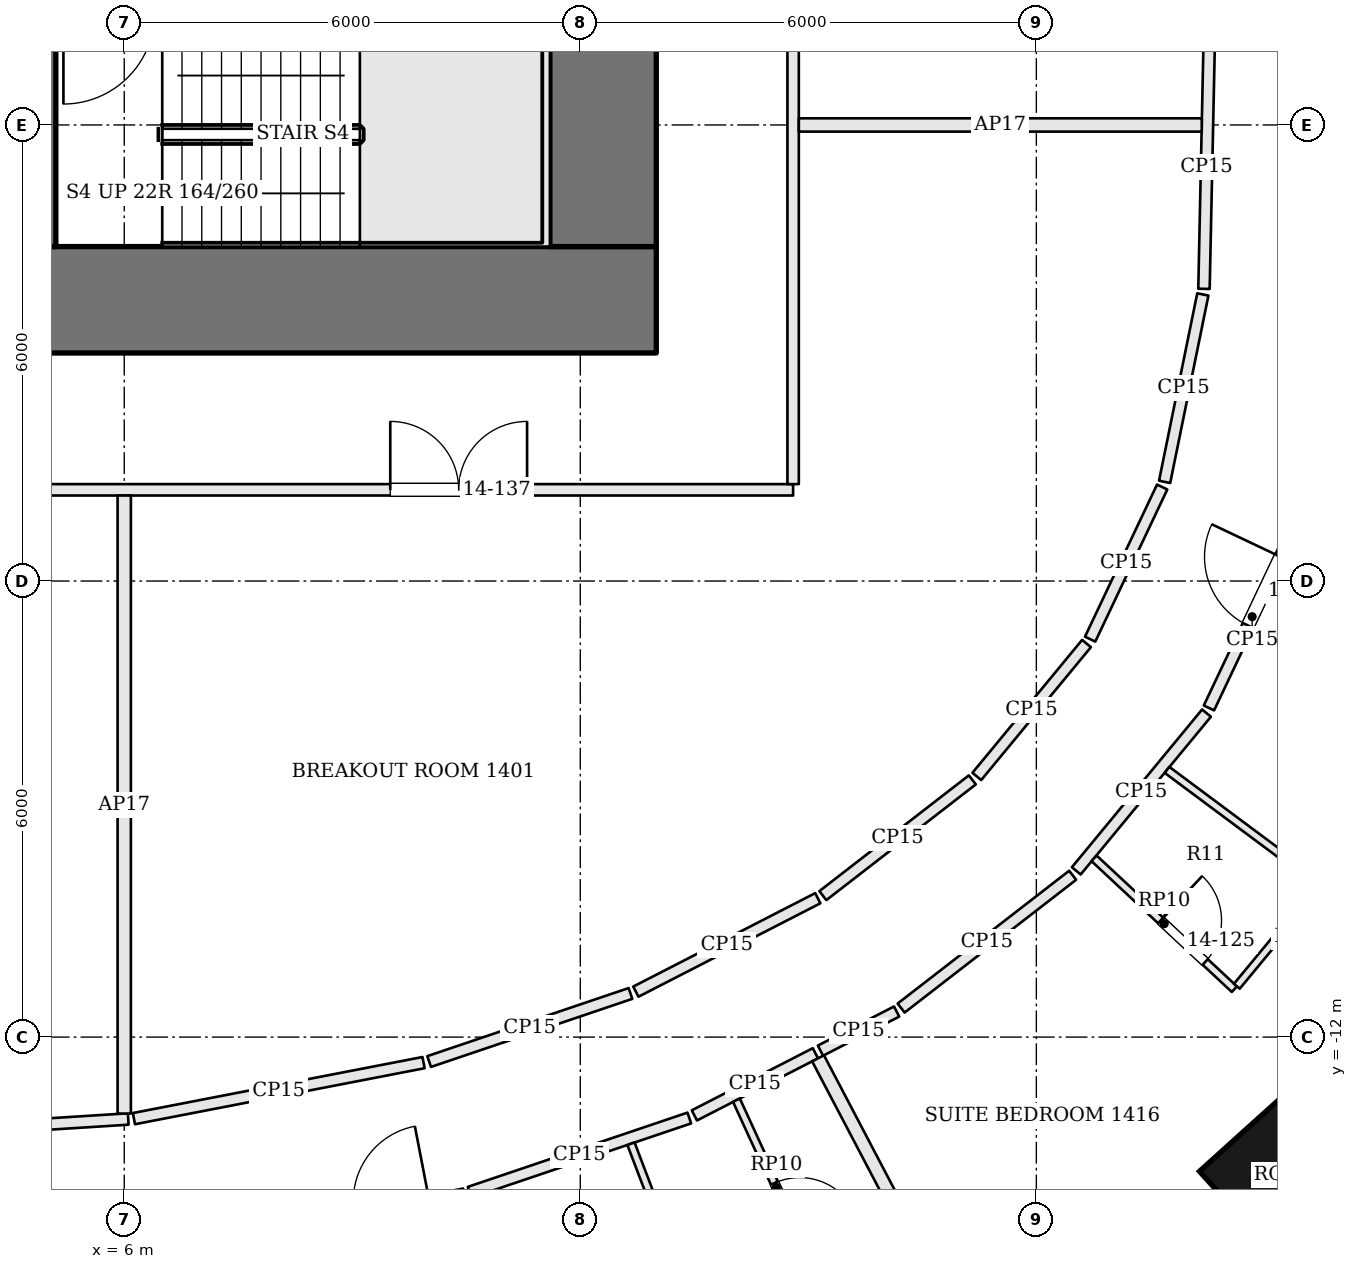
"""IFC4 building model, lengths in metres.
Left out: names, types, materials, properties, quantities, classifications, styles, units other than length and angle.
Written with IfcOpenShell. Run it as: python <this file> out.ifc"""

import sys

from ifc_helpers import new_model, si_unit, direction, frame, frame_2d, origin, origin_2d, place, context, subcontext, project, spatial, rectangle, extrude, element, fill, save


model = new_model("IFC4")
c1 = context("Model", 3, precision=1e-05, world=origin(), true_north=direction((0.0, 1.0)))
c2 = subcontext(c1, "Body", "Model", "MODEL_VIEW")
j1 = project(units=[si_unit("LENGTHUNIT", "METRE"), si_unit("PLANEANGLEUNIT", "RADIAN")], contexts=[c1])
p1 = place(None, origin())
s1 = spatial("IfcSite", under=j1, at=p1, CompositionType="ELEMENT")
p2 = place(p1, origin())
s2 = spatial("IfcBuilding", under=s1, at=p2, CompositionType="ELEMENT")
p3 = place(p2, frame((0.0, 0.0, 66.3)))
s3 = spatial("IfcBuildingStorey", under=s2, at=p3, CompositionType="ELEMENT", Elevation=66.3)
p4 = place(p3, frame((-13.0, -2.3, 0.0), z_axis=(0.0, 0.0, 1.0), x_axis=(1.0, 0.0, 0.0)))
e1 = element("IfcWall", 1, at=p4, inside=s3, PredefinedType="SHEAR", context=c2, shape_type="SweptSolid", body=[
    extrude(rectangle(XDim=26.0, YDim=1.4, at=frame_2d((13.0, 0.0))), origin(), (0.0, 0.0, 1.0), 3.6),
])
p5 = place(p4, frame((8.825, 0.0, 0.0)))
e2 = element("IfcOpeningElement", 2, at=p5, cuts=e1, PredefinedType="OPENING", context=c2, shape_type="SweptSolid", body=[
    extrude(rectangle(XDim=1.0, YDim=2.1, at=frame_2d((0.5, 1.05))), frame((0.0, 0.71, 0.0), z_axis=(0.0, -1.0, 0.0), x_axis=(1.0, 0.0, 0.0)), (0.0, 0.0, 1.0), 1.42),
])
p6 = place(p4, frame((11.025, 0.0, 0.0)))
e3 = element("IfcOpeningElement", 3, at=p6, cuts=e1, PredefinedType="OPENING", context=c2, shape_type="SweptSolid", body=[
    extrude(rectangle(XDim=0.7, YDim=2.1, at=frame_2d((0.35, 1.05))), frame((0.0, 0.71, 0.0), z_axis=(0.0, -1.0, 0.0), x_axis=(1.0, 0.0, 0.0)), (0.0, 0.0, 1.0), 1.42),
])
p7 = place(p4, frame((12.925, 0.0, 0.0)))
e4 = element("IfcOpeningElement", 4, at=p7, cuts=e1, PredefinedType="OPENING", context=c2, shape_type="SweptSolid", body=[
    extrude(rectangle(XDim=1.0, YDim=2.1, at=frame_2d((0.5, 1.05))), frame((0.0, 0.71, 0.0), z_axis=(0.0, -1.0, 0.0), x_axis=(1.0, 0.0, 0.0)), (0.0, 0.0, 1.0), 1.42),
])
p8 = place(p4, frame((15.775, 0.0, 0.0)))
e5 = element("IfcOpeningElement", 5, at=p8, cuts=e1, PredefinedType="OPENING", context=c2, shape_type="SweptSolid", body=[
    extrude(rectangle(XDim=1.0, YDim=2.1, at=frame_2d((0.5, 1.05))), frame((0.0, 0.71, 0.0), z_axis=(0.0, -1.0, 0.0), x_axis=(1.0, 0.0, 0.0)), (0.0, 0.0, 1.0), 1.42),
])
p9 = place(p3, frame((12.3, -1.6, 0.0), z_axis=(0.0, 0.0, 1.0), x_axis=(0.0, 1.0, 0.0)))
e6 = element("IfcWall", 6, at=p9, inside=s3, PredefinedType="SHEAR", context=c2, shape_type="SweptSolid", body=[
    extrude(rectangle(XDim=12.2, YDim=1.4, at=frame_2d((6.1, 0.0))), origin(), (0.0, 0.0, 1.0), 3.6),
])
p10 = place(p9, frame((6.8, 0.0, 0.0)))
e7 = element("IfcOpeningElement", 7, at=p10, cuts=e6, PredefinedType="OPENING", context=c2, shape_type="SweptSolid", body=[
    extrude(rectangle(XDim=1.8, YDim=2.1, at=frame_2d((0.9, 1.05))), frame((0.0, 0.71, 0.0), z_axis=(0.0, -1.0, 0.0), x_axis=(1.0, 0.0, 0.0)), (0.0, 0.0, 1.0), 1.42),
])
p11 = place(p3, frame((21.135, -13.817, 0.0), z_axis=(0.0, 0.0, 1.0), x_axis=(0.742675944539, 0.66965098477, 0.0)))
e8 = element("IfcColumn", 8, at=p11, inside=s3, PredefinedType="COLUMN", context=c2, shape_type="SweptSolid", body=[
    extrude(rectangle(XDim=1.4, YDim=1.4, at=origin_2d()), origin(), (0.0, 0.0, 1.0), 3.6),
])
p12 = place(p3, frame((21.266, -14.805, 0.0), z_axis=(0.0, 0.0, 1.0), x_axis=(0.861975457737, 0.506950007653, 0.0)))
e9 = element("IfcWall", 9, at=p12, inside=s3, PredefinedType="SOLIDWALL", context=c2, shape_type="SweptSolid", body=[
    extrude(rectangle(XDim=4.413, YDim=0.45, at=frame_2d((2.207, 0.0))), origin(), (0.0, 0.0, 1.0), 3.4),
])
p13 = place(p12, frame((1.156, 0.0, 0.9)))
e10 = element("IfcOpeningElement", 10, at=p13, cuts=e9, PredefinedType="OPENING", context=c2, shape_type="SweptSolid", body=[
    extrude(rectangle(XDim=2.1, YDim=2.0, at=frame_2d((1.05, 1.0))), frame((0.0, 0.235, 0.0), z_axis=(0.0, -1.0, 0.0), x_axis=(1.0, 0.0, 0.0)), (0.0, 0.0, 1.0), 0.47),
])
p14 = place(p3, frame((4.975, 10.6, 0.0), z_axis=(0.0, 0.0, 1.0), x_axis=(0.0, -1.0, 0.0)))
e11 = element("IfcWall", 11, at=p14, inside=s3, PredefinedType="SOLIDWALL", context=c2, shape_type="SweptSolid", body=[
    extrude(rectangle(XDim=12.2, YDim=0.25, at=frame_2d((6.1, 0.0))), origin(), (0.0, 0.0, 1.0), 3.4),
])
p15 = place(p14, frame((4.65, 0.0, 0.0)))
e12 = element("IfcOpeningElement", 12, at=p15, cuts=e11, PredefinedType="OPENING", context=c2, shape_type="SweptSolid", body=[
    extrude(rectangle(XDim=1.2, YDim=2.1, at=frame_2d((0.6, 1.05))), frame((0.0, 0.135, 0.0), z_axis=(0.0, -1.0, 0.0), x_axis=(1.0, 0.0, 0.0)), (0.0, 0.0, 1.0), 0.27),
])
p16 = place(p3, frame((6.43, -14.848, 0.0), z_axis=(0.0, 0.0, 1.0), x_axis=(0.981801609996, 0.189909448446, 0.0)))
e13 = element("IfcWall", 13, at=p16, inside=s3, PredefinedType="PARTITIONING", context=c2, shape_type="SweptSolid", body=[
    extrude(rectangle(XDim=4.118, YDim=0.15, at=frame_2d((2.059, 0.0))), origin(), (0.0, 0.0, 1.0), 2.68),
])
p17 = place(p16, frame((2.65, 0.0, 0.0)))
e14 = element("IfcOpeningElement", 14, at=p17, cuts=e13, PredefinedType="OPENING", context=c2, shape_type="SweptSolid", body=[
    extrude(rectangle(XDim=1.0, YDim=2.1, at=frame_2d((0.5, 1.05))), frame((0.0, 0.085, 0.0), z_axis=(0.0, -1.0, 0.0), x_axis=(1.0, 0.0, 0.0)), (0.0, 0.0, 1.0), 0.17),
])
p18 = place(p3, frame((10.544, -14.042, 0.0), z_axis=(0.0, 0.0, 1.0), x_axis=(0.947314242069, 0.320305677085, 0.0)))
e15 = element("IfcWall", 15, at=p18, inside=s3, PredefinedType="PARTITIONING", context=c2, shape_type="SweptSolid", body=[
    extrude(rectangle(XDim=3.051, YDim=0.15, at=frame_2d((1.525, 0.0))), origin(), (0.0, 0.0, 1.0), 2.68),
])
p19 = place(p3, frame((13.501, -13.03, 0.0), z_axis=(0.0, 0.0, 1.0), x_axis=(0.88960147572, 0.456737577168, 0.0)))
e16 = element("IfcWall", 16, at=p19, inside=s3, PredefinedType="PARTITIONING", context=c2, shape_type="SweptSolid", body=[
    extrude(rectangle(XDim=1.79, YDim=0.15, at=frame_2d((0.895, 0.0))), origin(), (0.0, 0.0, 1.0), 2.68),
])
p20 = place(p3, frame((18.439, -18.586, 0.0), z_axis=(0.0, 0.0, 1.0), x_axis=(-0.464812403085, 0.885409187855, 0.0)))
e17 = element("IfcWall", 17, at=p20, inside=s3, PredefinedType="PARTITIONING", context=c2, shape_type="SweptSolid", body=[
    extrude(rectangle(XDim=7.123, YDim=0.175, at=frame_2d((3.562, 0.0))), origin(), (0.0, 0.0, 1.0), 2.68),
])
p21 = place(p3, frame((15.16, -12.178, 0.0), z_axis=(0.0, 0.0, 1.0), x_axis=(0.889562255844, 0.456813958826, 0.0)))
e18 = element("IfcWall", 18, at=p21, inside=s3, PredefinedType="PARTITIONING", context=c2, shape_type="SweptSolid", body=[
    extrude(rectangle(XDim=1.126, YDim=0.15, at=frame_2d((0.563, 0.0))), origin(), (0.0, 0.0, 1.0), 2.68),
])
p22 = place(p3, frame((16.221, -11.618, 0.0), z_axis=(0.0, 0.0, 1.0), x_axis=(0.79075977513, 0.612126602948, 0.0)))
e19 = element("IfcWall", 19, at=p22, inside=s3, PredefinedType="PARTITIONING", context=c2, shape_type="SweptSolid", body=[
    extrude(rectangle(XDim=2.854, YDim=0.15, at=frame_2d((1.427, 0.0))), origin(), (0.0, 0.0, 1.0), 2.68),
])
p23 = place(p3, frame((18.525, -9.813, 0.0), z_axis=(0.0, 0.0, 1.0), x_axis=(0.636590727548, 0.771201818981, 0.0)))
e20 = element("IfcWall", 20, at=p23, inside=s3, PredefinedType="PARTITIONING", context=c2, shape_type="SweptSolid", body=[
    extrude(rectangle(XDim=2.691, YDim=0.15, at=frame_2d((1.346, 0.0))), origin(), (0.0, 0.0, 1.0), 2.68),
])
p24 = place(p3, frame((20.271, -7.67, 0.0), z_axis=(0.0, 0.0, 1.0), x_axis=(0.427995478521, 0.903780875193, 0.0)))
e21 = element("IfcWall", 21, at=p24, inside=s3, PredefinedType="PARTITIONING", context=c2, shape_type="SweptSolid", body=[
    extrude(rectangle(XDim=2.656, YDim=0.15, at=frame_2d((1.328, 0.0))), origin(), (0.0, 0.0, 1.0), 2.68),
])
p25 = place(p24, frame((1.2, 0.0, 0.0)))
e22 = element("IfcOpeningElement", 22, at=p25, cuts=e21, PredefinedType="OPENING", context=c2, shape_type="SweptSolid", body=[
    extrude(rectangle(XDim=1.0, YDim=2.1, at=frame_2d((0.5, 1.05))), frame((0.0, 0.085, 0.0), z_axis=(0.0, -1.0, 0.0), x_axis=(1.0, 0.0, 0.0)), (0.0, 0.0, 1.0), 0.17),
])
p26 = place(p3, frame((-14.725, -4.8, 0.0), z_axis=(0.0, 0.0, 1.0), x_axis=(1.0, 0.0, 0.0)))
e23 = element("IfcWall", 23, at=p26, inside=s3, PredefinedType="PARTITIONING", context=c2, shape_type="SweptSolid", body=[
    extrude(rectangle(XDim=29.525, YDim=0.15, at=frame_2d((14.763, 0.0))), origin(), (0.0, 0.0, 1.0), 2.68),
])
p27 = place(p26, frame((3.425, 0.0, 0.0)))
e24 = element("IfcOpeningElement", 24, at=p27, cuts=e23, PredefinedType="OPENING", context=c2, shape_type="SweptSolid", body=[
    extrude(rectangle(XDim=1.8, YDim=2.1, at=frame_2d((0.9, 1.05))), frame((0.0, 0.085, 0.0), z_axis=(0.0, -1.0, 0.0), x_axis=(1.0, 0.0, 0.0)), (0.0, 0.0, 1.0), 0.17),
])
p28 = place(p26, frame((13.825, 0.0, 0.0)))
e25 = element("IfcOpeningElement", 25, at=p28, cuts=e23, PredefinedType="OPENING", context=c2, shape_type="SweptSolid", body=[
    extrude(rectangle(XDim=1.8, YDim=2.1, at=frame_2d((0.9, 1.05))), frame((0.0, 0.085, 0.0), z_axis=(0.0, -1.0, 0.0), x_axis=(1.0, 0.0, 0.0)), (0.0, 0.0, 1.0), 0.17),
])
p29 = place(p26, frame((24.225, 0.0, 0.0)))
e26 = element("IfcOpeningElement", 26, at=p29, cuts=e23, PredefinedType="OPENING", context=c2, shape_type="SweptSolid", body=[
    extrude(rectangle(XDim=1.8, YDim=2.1, at=frame_2d((0.9, 1.05))), frame((0.0, 0.085, 0.0), z_axis=(0.0, -1.0, 0.0), x_axis=(1.0, 0.0, 0.0)), (0.0, 0.0, 1.0), 0.17),
])
p30 = place(p3, frame((14.8, -4.725, 0.0), z_axis=(0.0, 0.0, 1.0), x_axis=(0.0, 1.0, 0.0)))
e27 = element("IfcWall", 27, at=p30, inside=s3, PredefinedType="PARTITIONING", context=c2, shape_type="SweptSolid", body=[
    extrude(rectangle(XDim=15.008, YDim=0.15, at=frame_2d((7.504, 0.0))), origin(), (0.0, 0.0, 1.0), 2.68),
])
p31 = place(p30, frame((9.366, 0.0, 0.0)))
e28 = element("IfcOpeningElement", 28, at=p31, cuts=e27, PredefinedType="OPENING", context=c2, shape_type="SweptSolid", body=[
    extrude(rectangle(XDim=1.0, YDim=2.1, at=frame_2d((0.5, 1.05))), frame((0.0, 0.085, 0.0), z_axis=(0.0, -1.0, 0.0), x_axis=(1.0, 0.0, 0.0)), (0.0, 0.0, 1.0), 0.17),
])
p32 = place(p3, frame((20.273, 1.061, 0.0), z_axis=(0.0, 0.0, 1.0), x_axis=(-0.021166906337, -0.99977595594, 0.0)))
e29 = element("IfcWall", 29, at=p32, inside=s3, PredefinedType="PARTITIONING", context=c2, shape_type="SweptSolid", body=[
    extrude(rectangle(XDim=3.218, YDim=0.15, at=frame_2d((1.609, 0.0))), origin(), (0.0, 0.0, 1.0), 2.68),
])
p33 = place(p3, frame((20.19, -2.229, 0.0), z_axis=(0.0, 0.0, 1.0), x_axis=(-0.199752828647, -0.97984631828, 0.0)))
e30 = element("IfcWall", 30, at=p33, inside=s3, PredefinedType="PARTITIONING", context=c2, shape_type="SweptSolid", body=[
    extrude(rectangle(XDim=2.517, YDim=0.15, at=frame_2d((1.258, 0.0))), origin(), (0.0, 0.0, 1.0), 2.68),
])
p34 = place(p3, frame((19.655, -4.763, 0.0), z_axis=(0.0, 0.0, 1.0), x_axis=(-0.427972604023, -0.903791707312, 0.0)))
e31 = element("IfcWall", 31, at=p34, inside=s3, PredefinedType="PARTITIONING", context=c2, shape_type="SweptSolid", body=[
    extrude(rectangle(XDim=2.215, YDim=0.15, at=frame_2d((1.107, 0.0))), origin(), (0.0, 0.0, 1.0), 2.68),
])
p35 = place(p3, frame((18.66, -6.823, 0.0), z_axis=(0.0, 0.0, 1.0), x_axis=(-0.636575205534, -0.771214631409, 0.0)))
e32 = element("IfcWall", 32, at=p35, inside=s3, PredefinedType="PARTITIONING", context=c2, shape_type="SweptSolid", body=[
    extrude(rectangle(XDim=2.267, YDim=0.15, at=frame_2d((1.133, 0.0))), origin(), (0.0, 0.0, 1.0), 2.68),
])
p36 = place(p3, frame((17.158, -8.616, 0.0), z_axis=(0.0, 0.0, 1.0), x_axis=(-0.790740570998, -0.612151410501, 0.0)))
e33 = element("IfcWall", 33, at=p36, inside=s3, PredefinedType="PARTITIONING", context=c2, shape_type="SweptSolid", body=[
    extrude(rectangle(XDim=2.487, YDim=0.15, at=frame_2d((1.243, 0.0))), origin(), (0.0, 0.0, 1.0), 2.68),
])
p37 = place(p3, frame((15.125, -10.173, 0.0), z_axis=(0.0, 0.0, 1.0), x_axis=(-0.889567018144, -0.456804684993, 0.0)))
e34 = element("IfcWall", 34, at=p37, inside=s3, PredefinedType="PARTITIONING", context=c2, shape_type="SweptSolid", body=[
    extrude(rectangle(XDim=2.691, YDim=0.15, at=frame_2d((1.345, 0.0))), origin(), (0.0, 0.0, 1.0), 2.68),
])
p38 = place(p3, frame((12.66, -11.426, 0.0), z_axis=(0.0, 0.0, 1.0), x_axis=(-0.94731220982, -0.320311687465, 0.0)))
e35 = element("IfcWall", 35, at=p38, inside=s3, PredefinedType="PARTITIONING", context=c2, shape_type="SweptSolid", body=[
    extrude(rectangle(XDim=2.796, YDim=0.15, at=frame_2d((1.398, 0.0))), origin(), (0.0, 0.0, 1.0), 2.68),
])
p39 = place(p3, frame((9.938, -12.336, 0.0), z_axis=(0.0, 0.0, 1.0), x_axis=(-0.981799909949, -0.18991823721, 0.0)))
e36 = element("IfcWall", 36, at=p39, inside=s3, PredefinedType="PARTITIONING", context=c2, shape_type="SweptSolid", body=[
    extrude(rectangle(XDim=3.881, YDim=0.15, at=frame_2d((1.94, 0.0))), origin(), (0.0, 0.0, 1.0), 2.68),
])
p40 = place(p3, frame((6.053, -13.077, 0.0), z_axis=(0.0, 0.0, 1.0), x_axis=(-0.997994823425, -0.06329559556, 0.0)))
e37 = element("IfcWall", 37, at=p40, inside=s3, PredefinedType="PARTITIONING", context=c2, shape_type="SweptSolid", body=[
    extrude(rectangle(XDim=4.987, YDim=0.15, at=frame_2d((2.494, 0.0))), origin(), (0.0, 0.0, 1.0), 2.68),
])
p41 = place(p3, frame((15.837, -21.743, 0.0), z_axis=(0.0, 0.0, 1.0), x_axis=(-0.355314828952, 0.934746688856, 0.0)))
e38 = element("IfcWall", 38, at=p41, inside=s3, PredefinedType="PARTITIONING", context=c2, shape_type="SweptSolid", body=[
    extrude(rectangle(XDim=8.923, YDim=0.1, at=frame_2d((4.461, 0.0))), origin(), (0.0, 0.0, 1.0), 2.68),
])
p42 = place(p41, frame((5.0, 0.0, 0.0)))
e39 = element("IfcOpeningElement", 39, at=p42, cuts=e38, PredefinedType="OPENING", context=c2, shape_type="SweptSolid", body=[
    extrude(rectangle(XDim=0.9, YDim=2.4, at=frame_2d((0.45, 1.2))), frame((0.0, 0.06, 0.0), z_axis=(0.0, -1.0, 0.0), x_axis=(1.0, 0.0, 0.0)), (0.0, 0.0, 1.0), 0.12),
])
p43 = place(p3, frame((14.054, -12.83, 0.0), z_axis=(0.0, 0.0, 1.0), x_axis=(0.416714635196, -0.909037355015, 0.0)))
e40 = element("IfcWall", 40, at=p43, inside=s3, PredefinedType="PARTITIONING", context=c2, shape_type="SweptSolid", body=[
    extrude(rectangle(XDim=2.525, YDim=0.1, at=frame_2d((1.263, 0.0))), origin(), (0.0, 0.0, 1.0), 2.68),
])
p44 = place(p43, frame((1.2, 0.0, 0.0)))
e41 = element("IfcOpeningElement", 41, at=p44, cuts=e40, PredefinedType="OPENING", context=c2, shape_type="SweptSolid", body=[
    extrude(rectangle(XDim=0.8, YDim=2.1, at=frame_2d((0.4, 1.05))), frame((0.0, 0.06, 0.0), z_axis=(0.0, -1.0, 0.0), x_axis=(1.0, 0.0, 0.0)), (0.0, 0.0, 1.0), 0.12),
])
p45 = place(p3, frame((24.946, -12.375, 0.0), z_axis=(0.0, 0.0, 1.0), x_axis=(-0.802211102923, 0.597040489705, 0.0)))
e42 = element("IfcWall", 42, at=p45, inside=s3, PredefinedType="PARTITIONING", context=c2, shape_type="SweptSolid", body=[
    extrude(rectangle(XDim=6.516, YDim=0.1, at=frame_2d((3.258, 0.0))), origin(), (0.0, 0.0, 1.0), 2.68),
])
p46 = place(p45, frame((2.441, 0.0, 0.0)))
e43 = element("IfcOpeningElement", 43, at=p46, cuts=e42, PredefinedType="OPENING", context=c2, shape_type="SweptSolid", body=[
    extrude(rectangle(XDim=0.9, YDim=2.4, at=frame_2d((0.45, 1.2))), frame((0.0, 0.06, 0.0), z_axis=(0.0, -1.0, 0.0), x_axis=(1.0, 0.0, 0.0)), (0.0, 0.0, 1.0), 0.12),
])
p47 = place(p3, frame((18.759, -9.648, 0.0), z_axis=(0.0, 0.0, 1.0), x_axis=(0.731331715945, -0.682021936049, 0.0)))
e44 = element("IfcWall", 44, at=p47, inside=s3, PredefinedType="PARTITIONING", context=c2, shape_type="SweptSolid", body=[
    extrude(rectangle(XDim=2.525, YDim=0.1, at=frame_2d((1.263, 0.0))), origin(), (0.0, 0.0, 1.0), 2.68),
])
p48 = place(p47, frame((1.2, 0.0, 0.0)))
e45 = element("IfcOpeningElement", 45, at=p48, cuts=e44, PredefinedType="OPENING", context=c2, shape_type="SweptSolid", body=[
    extrude(rectangle(XDim=0.8, YDim=2.1, at=frame_2d((0.4, 1.05))), frame((0.0, 0.06, 0.0), z_axis=(0.0, -1.0, 0.0), x_axis=(1.0, 0.0, 0.0)), (0.0, 0.0, 1.0), 0.12),
])
p49 = place(p3, frame((20.637, -11.331, 0.0), z_axis=(0.0, 0.0, 1.0), x_axis=(0.637105732439, 0.770776417447, 0.0)))
e46 = element("IfcWall", 46, at=p49, inside=s3, PredefinedType="PARTITIONING", context=c2, shape_type="SweptSolid", body=[
    extrude(rectangle(XDim=1.688, YDim=0.1, at=frame_2d((0.844, 0.0))), origin(), (0.0, 0.0, 1.0), 2.68),
])
p50 = place(p3, frame((6.0, -13.006, 0.0), z_axis=(0.0, 0.0, 1.0), x_axis=(0.0, 1.0, 0.0)))
e47 = element("IfcWall", 47, at=p50, inside=s3, PredefinedType="PARTITIONING", context=c2, shape_type="SweptSolid", body=[
    extrude(rectangle(XDim=8.131, YDim=0.175, at=frame_2d((4.065, 0.0))), origin(), (0.0, 0.0, 1.0), 2.68),
])
p51 = place(p3, frame((14.875, 0.0, 0.0), z_axis=(0.0, 0.0, 1.0), x_axis=(1.0, 0.0, 0.0)))
e48 = element("IfcWall", 48, at=p51, inside=s3, PredefinedType="PARTITIONING", context=c2, shape_type="SweptSolid", body=[
    extrude(rectangle(XDim=5.301, YDim=0.175, at=frame_2d((2.65, 0.0))), origin(), (0.0, 0.0, 1.0), 2.68),
])
p52 = place(p44, origin())
e49 = element("IfcDoor", 49, at=p52, inside=s3, OperationType="SINGLE_SWING_RIGHT", PredefinedType="DOOR", context=c2, shape_type="SweptSolid", body=[
    extrude(rectangle(XDim=0.8, YDim=2.1, at=frame_2d((0.4, 1.05))), frame((0.0, 0.025, 0.0), z_axis=(0.0, -1.0, 0.0), x_axis=(1.0, 0.0, 0.0)), (0.0, 0.0, 1.0), 0.05),
])
fill(e41, e49)
p53 = place(p48, origin())
e50 = element("IfcDoor", 50, at=p53, inside=s3, OperationType="SINGLE_SWING_LEFT", PredefinedType="DOOR", context=c2, shape_type="SweptSolid", body=[
    extrude(rectangle(XDim=0.8, YDim=2.1, at=frame_2d((0.4, 1.05))), frame((0.0, 0.025, 0.0), z_axis=(0.0, -1.0, 0.0), x_axis=(1.0, 0.0, 0.0)), (0.0, 0.0, 1.0), 0.05),
])
fill(e45, e50)
p54 = place(p25, origin())
e51 = element("IfcDoor", 51, at=p54, inside=s3, OperationType="SINGLE_SWING_RIGHT", PredefinedType="DOOR", context=c2, shape_type="SweptSolid", body=[
    extrude(rectangle(XDim=1.0, YDim=2.1, at=frame_2d((0.5, 1.05))), frame((0.0, 0.025, 0.0), z_axis=(0.0, -1.0, 0.0), x_axis=(1.0, 0.0, 0.0)), (0.0, 0.0, 1.0), 0.05),
])
fill(e22, e51)
p55 = place(p29, origin())
e52 = element("IfcDoor", 52, at=p55, inside=s3, OperationType="DOUBLE_DOOR_SINGLE_SWING", PredefinedType="DOOR", context=c2, shape_type="SweptSolid", body=[
    extrude(rectangle(XDim=1.8, YDim=2.1, at=frame_2d((0.9, 1.05))), frame((0.0, 0.025, 0.0), z_axis=(0.0, -1.0, 0.0), x_axis=(1.0, 0.0, 0.0)), (0.0, 0.0, 1.0), 0.05),
])
fill(e26, e52)
save(model, sys.argv[1])
